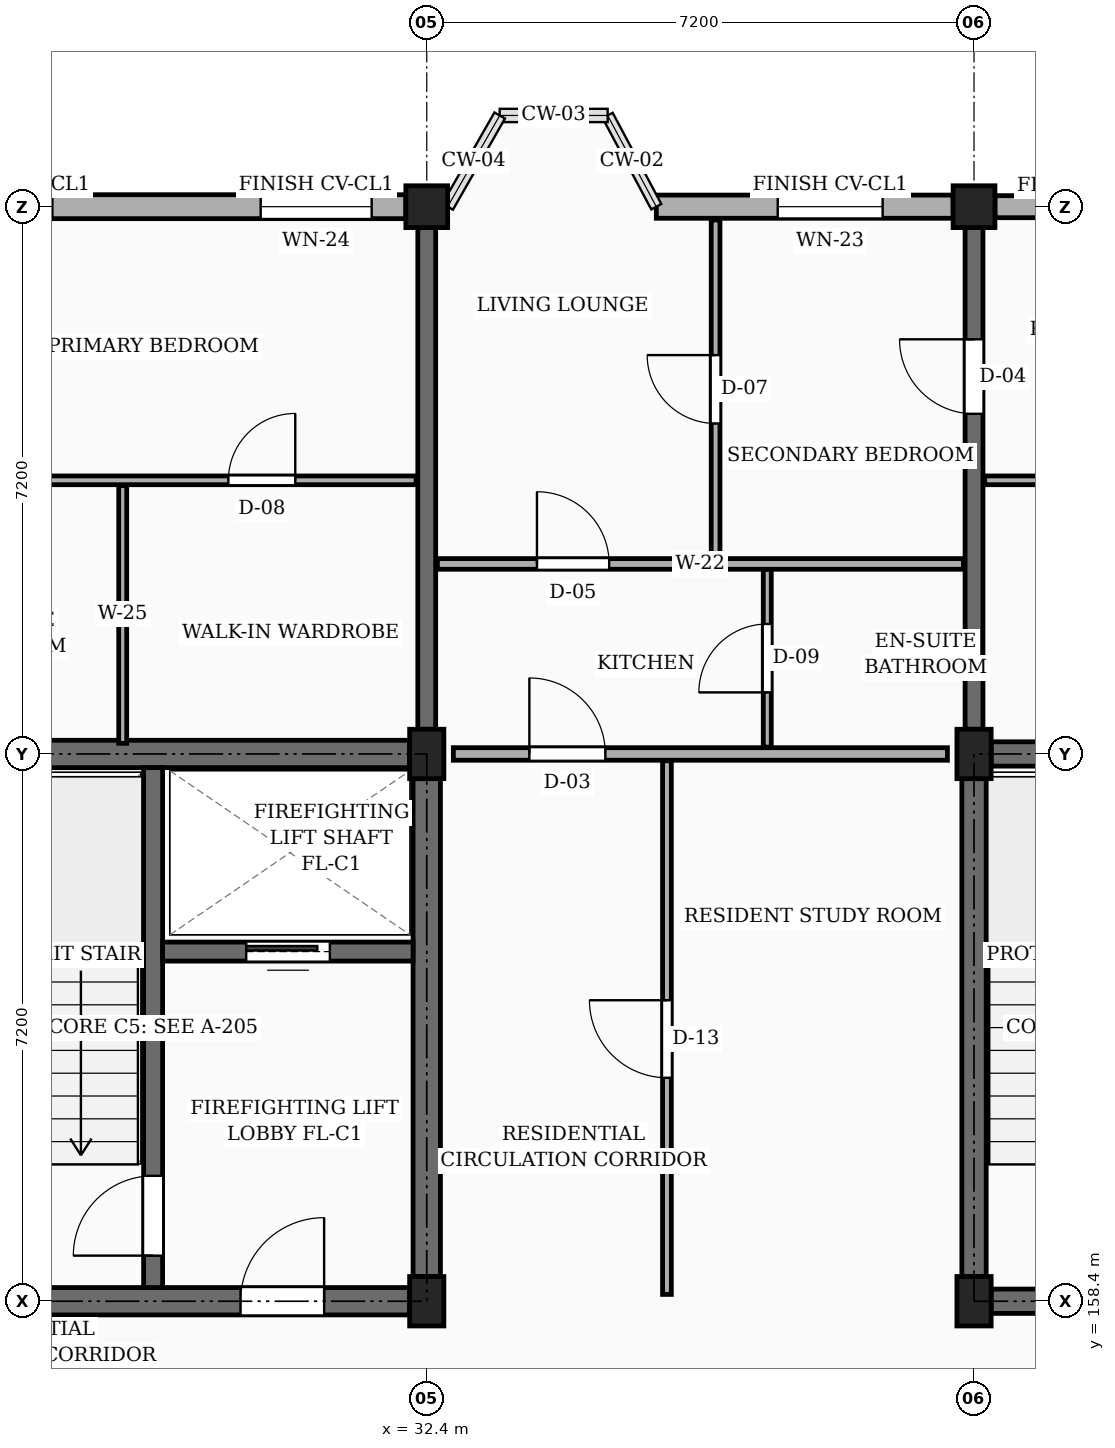
"""IFC4 building model, lengths in metres.
Left out: names, types, materials, properties, quantities, classifications, styles, units other than length and angle.
Written with IfcOpenShell. Run it as: python <this file> out.ifc"""

import sys

from ifc_helpers import new_model, si_unit, direction, frame, frame_2d, origin, origin_2d, place, context, subcontext, project, spatial, rectangle, extrude, element, fill, save


model = new_model("IFC4")
c1 = context("Model", 3, precision=1e-05, world=origin(), true_north=direction((0.0, 1.0)))
c2 = subcontext(c1, "Body", "Model", "MODEL_VIEW")
j1 = project(units=[si_unit("LENGTHUNIT", "METRE"), si_unit("PLANEANGLEUNIT", "RADIAN")], contexts=[c1])
p1 = place(None, origin())
s1 = spatial("IfcSite", under=j1, at=p1, CompositionType="ELEMENT")
p2 = place(p1, origin())
s2 = spatial("IfcBuilding", under=s1, at=p2, CompositionType="ELEMENT")
p3 = place(p2, frame((0.0, 0.0, 20.25)))
s3 = spatial("IfcBuildingStorey", under=s2, at=p3, CompositionType="ELEMENT", Elevation=20.25)
for number, where, z_axis, x_axis in (
    (1, (32.4, 158.4, 0.0), (0.0, 0.0, 1.0), (1.0, 0.0, 0.0)),
    (2, (32.4, 165.6, 0.0), (0.0, 0.0, 1.0), (1.0, 0.0, 0.0)),
):
    element("IfcColumn", number, at=place(p3, frame(where, z_axis=z_axis, x_axis=x_axis)), inside=s3, PredefinedType="COLUMN", context=c2, shape_type="SweptSolid", body=[
        extrude(rectangle(XDim=0.45, YDim=0.65, at=origin_2d()), origin(), (0.0, 0.0, 1.0), 3.15),
    ])
p4 = place(p3, frame((32.4, 172.8, 0.0), z_axis=(0.0, 0.0, 1.0), x_axis=(1.0, 0.0, 0.0)))
e3 = element("IfcColumn", 3, at=p4, inside=s3, PredefinedType="COLUMN", context=c2, shape_type="SweptSolid", body=[
    extrude(rectangle(XDim=0.55, YDim=0.55, at=origin_2d()), origin(), (0.0, 0.0, 1.0), 3.15),
])
for number, where, z_axis, x_axis in (
    (4, (39.6, 158.4, 0.0), (0.0, 0.0, 1.0), (1.0, 0.0, 0.0)),
    (5, (39.6, 165.6, 0.0), (0.0, 0.0, 1.0), (1.0, 0.0, 0.0)),
):
    element("IfcColumn", number, at=place(p3, frame(where, z_axis=z_axis, x_axis=x_axis)), inside=s3, PredefinedType="COLUMN", context=c2, shape_type="SweptSolid", body=[
        extrude(rectangle(XDim=0.45, YDim=0.65, at=origin_2d()), origin(), (0.0, 0.0, 1.0), 3.15),
    ])
p5 = place(p3, frame((39.6, 172.8, 0.0), z_axis=(0.0, 0.0, 1.0), x_axis=(1.0, 0.0, 0.0)))
e6 = element("IfcColumn", 6, at=p5, inside=s3, PredefinedType="COLUMN", context=c2, shape_type="SweptSolid", body=[
    extrude(rectangle(XDim=0.55, YDim=0.55, at=origin_2d()), origin(), (0.0, 0.0, 1.0), 3.15),
])
p6 = place(p3, frame((32.4, 165.925, 0.0), z_axis=(0.0, 0.0, 1.0), x_axis=(0.0, 1.0, 0.0)))
e7 = element("IfcWall", 7, at=p6, inside=s3, PredefinedType="SOLIDWALL", context=c2, shape_type="SweptSolid", body=[
    extrude(rectangle(XDim=6.6, YDim=0.235, at=frame_2d((3.3, 0.0))), origin(), (0.0, 0.0, 1.0), 2.185),
])
p7 = place(p3, frame((39.6, 165.925, 0.0), z_axis=(0.0, 0.0, 1.0), x_axis=(0.0, 1.0, 0.0)))
e8 = element("IfcWall", 8, at=p7, inside=s3, PredefinedType="SOLIDWALL", context=c2, shape_type="SweptSolid", body=[
    extrude(rectangle(XDim=6.6, YDim=0.235, at=frame_2d((3.3, 0.0))), origin(), (0.0, 0.0, 1.0), 2.185),
])
p8 = place(p7, frame((4.15, 0.0, 0.0)))
e9 = element("IfcOpeningElement", 9, at=p8, cuts=e8, PredefinedType="OPENING", context=c2, shape_type="SweptSolid", body=[
    extrude(rectangle(XDim=0.98, YDim=2.12, at=frame_2d((0.49, 1.06))), frame((0.0, 0.127, 0.0), z_axis=(0.0, -1.0, 0.0), x_axis=(1.0, 0.0, 0.0)), (0.0, 0.0, 1.0), 0.255),
])
p9 = place(p3, frame((46.525, 172.8, 0.0), z_axis=(0.0, 0.0, 1.0), x_axis=(-1.0, 0.0, 0.0)))
e10 = element("IfcWall", 10, at=p9, inside=s3, PredefinedType="SOLIDWALL", context=c2, shape_type="SweptSolid", body=[
    extrude(rectangle(XDim=6.65, YDim=0.29, at=frame_2d((3.325, 0.0))), origin(), (0.0, 0.0, 1.0), 2.455),
])
p10 = place(p9, frame((0.45, 0.0, 0.78)))
e11 = element("IfcOpeningElement", 11, at=p10, cuts=e10, PredefinedType="OPENING", context=c2, shape_type="SweptSolid", body=[
    extrude(rectangle(XDim=1.22, YDim=1.36, at=frame_2d((0.61, 0.68))), frame((0.0, 0.155, 0.0), z_axis=(0.0, -1.0, 0.0), x_axis=(1.0, 0.0, 0.0)), (0.0, 0.0, 1.0), 0.31),
])
p11 = place(p9, frame((4.65, 0.0, 0.78)))
e12 = element("IfcOpeningElement", 12, at=p11, cuts=e10, PredefinedType="OPENING", context=c2, shape_type="SweptSolid", body=[
    extrude(rectangle(XDim=1.38, YDim=1.36, at=frame_2d((0.69, 0.68))), frame((0.0, 0.155, 0.0), z_axis=(0.0, -1.0, 0.0), x_axis=(1.0, 0.0, 0.0)), (0.0, 0.0, 1.0), 0.31),
])
p12 = place(p3, frame((39.325, 172.8, 0.0), z_axis=(0.0, 0.0, 1.0), x_axis=(-1.0, 0.0, 0.0)))
e13 = element("IfcWall", 13, at=p12, inside=s3, PredefinedType="SOLIDWALL", context=c2, shape_type="SweptSolid", body=[
    extrude(rectangle(XDim=3.905, YDim=0.305, at=frame_2d((1.953, 0.0))), origin(), (0.0, 0.0, 1.0), 2.455),
])
p13 = place(p12, frame((0.927, 0.0, 0.78)))
e14 = element("IfcOpeningElement", 14, at=p13, cuts=e13, PredefinedType="OPENING", context=c2, shape_type="SweptSolid", body=[
    extrude(rectangle(XDim=1.38, YDim=1.36, at=frame_2d((0.69, 0.68))), frame((0.0, 0.163, 0.0), z_axis=(0.0, -1.0, 0.0), x_axis=(1.0, 0.0, 0.0)), (0.0, 0.0, 1.0), 0.325),
])
p14 = place(p3, frame((32.125, 172.8, 0.0), z_axis=(0.0, 0.0, 1.0), x_axis=(-1.0, 0.0, 0.0)))
e15 = element("IfcWall", 15, at=p14, inside=s3, PredefinedType="SOLIDWALL", context=c2, shape_type="SweptSolid", body=[
    extrude(rectangle(XDim=6.65, YDim=0.315, at=frame_2d((3.325, 0.0))), origin(), (0.0, 0.0, 1.0), 2.455),
])
p15 = place(p14, frame((0.45, 0.0, 0.78)))
e16 = element("IfcOpeningElement", 16, at=p15, cuts=e15, PredefinedType="OPENING", context=c2, shape_type="SweptSolid", body=[
    extrude(rectangle(XDim=1.46, YDim=1.36, at=frame_2d((0.73, 0.68))), frame((0.0, 0.167, 0.0), z_axis=(0.0, -1.0, 0.0), x_axis=(1.0, 0.0, 0.0)), (0.0, 0.0, 1.0), 0.335),
])
p16 = place(p14, frame((4.65, 0.0, 0.78)))
e17 = element("IfcOpeningElement", 17, at=p16, cuts=e15, PredefinedType="OPENING", context=c2, shape_type="SweptSolid", body=[
    extrude(rectangle(XDim=1.05, YDim=1.44, at=frame_2d((0.525, 0.72))), frame((0.0, 0.167, 0.0), z_axis=(0.0, -1.0, 0.0), x_axis=(1.0, 0.0, 0.0)), (0.0, 0.0, 1.0), 0.335),
])
p17 = place(p3, frame((25.425, 165.6, 0.0), z_axis=(0.0, 0.0, 1.0), x_axis=(1.0, 0.0, 0.0)))
e18 = element("IfcWall", 18, at=p17, inside=s3, PredefinedType="SHEAR", context=c2, shape_type="SweptSolid", body=[
    extrude(rectangle(XDim=6.75, YDim=0.36, at=frame_2d((3.375, 0.0))), origin(), (0.0, 0.0, 1.0), 2.885),
])
p18 = place(p3, frame((32.4, 158.725, 0.0), z_axis=(0.0, 0.0, 1.0), x_axis=(0.0, 1.0, 0.0)))
e19 = element("IfcWall", 19, at=p18, inside=s3, PredefinedType="SHEAR", context=c2, shape_type="SweptSolid", body=[
    extrude(rectangle(XDim=6.55, YDim=0.36, at=frame_2d((3.275, 0.0))), origin(), (0.0, 0.0, 1.0), 2.885),
])
p19 = place(p3, frame((25.425, 158.4, 0.0), z_axis=(0.0, 0.0, 1.0), x_axis=(1.0, 0.0, 0.0)))
e20 = element("IfcWall", 20, at=p19, inside=s3, PredefinedType="SHEAR", context=c2, shape_type="SweptSolid", body=[
    extrude(rectangle(XDim=6.75, YDim=0.36, at=frame_2d((3.375, 0.0))), origin(), (0.0, 0.0, 1.0), 2.885),
])
p20 = place(p19, frame((4.525, 0.0, 0.0)))
e21 = element("IfcOpeningElement", 21, at=p20, cuts=e20, PredefinedType="OPENING", context=c2, shape_type="SweptSolid", body=[
    extrude(rectangle(XDim=1.1, YDim=2.15, at=frame_2d((0.55, 1.075))), frame((0.0, 0.19, 0.0), z_axis=(0.0, -1.0, 0.0), x_axis=(1.0, 0.0, 0.0)), (0.0, 0.0, 1.0), 0.38),
])
p21 = place(p3, frame((28.8, 158.58, 0.0), z_axis=(0.0, 0.0, 1.0), x_axis=(0.0, 1.0, 0.0)))
e22 = element("IfcWall", 22, at=p21, inside=s3, PredefinedType="SHEAR", context=c2, shape_type="SweptSolid", body=[
    extrude(rectangle(XDim=6.84, YDim=0.25, at=frame_2d((3.42, 0.0))), origin(), (0.0, 0.0, 1.0), 2.885),
])
p22 = place(p21, frame((0.42, 0.0, 0.0)))
e23 = element("IfcOpeningElement", 23, at=p22, cuts=e22, PredefinedType="OPENING", context=c2, shape_type="SweptSolid", body=[
    extrude(rectangle(XDim=1.05, YDim=2.15, at=frame_2d((0.525, 1.075))), frame((0.0, 0.135, 0.0), z_axis=(0.0, -1.0, 0.0), x_axis=(1.0, 0.0, 0.0)), (0.0, 0.0, 1.0), 0.27),
])
p23 = place(p3, frame((28.925, 163.0, 0.0), z_axis=(0.0, 0.0, 1.0), x_axis=(1.0, 0.0, 0.0)))
e24 = element("IfcWall", 24, at=p23, inside=s3, PredefinedType="SHEAR", context=c2, shape_type="SweptSolid", body=[
    extrude(rectangle(XDim=3.295, YDim=0.25, at=frame_2d((1.647, 0.0))), origin(), (0.0, 0.0, 1.0), 2.885),
])
p24 = place(p23, frame((1.1, 0.0, 0.0)))
e25 = element("IfcOpeningElement", 25, at=p24, cuts=e24, PredefinedType="OPENING", context=c2, shape_type="SweptSolid", body=[
    extrude(rectangle(XDim=1.1, YDim=2.2, at=frame_2d((0.55, 1.1))), frame((0.0, 0.135, 0.0), z_axis=(0.0, -1.0, 0.0), x_axis=(1.0, 0.0, 0.0)), (0.0, 0.0, 1.0), 0.27),
])
p25 = place(p3, frame((39.6, 158.725, 0.0), z_axis=(0.0, 0.0, 1.0), x_axis=(0.0, 1.0, 0.0)))
e26 = element("IfcWall", 26, at=p25, inside=s3, PredefinedType="SHEAR", context=c2, shape_type="SweptSolid", body=[
    extrude(rectangle(XDim=6.55, YDim=0.32, at=frame_2d((3.275, 0.0))), origin(), (0.0, 0.0, 1.0), 2.885),
])
p26 = place(p3, frame((39.825, 165.6, 0.0), z_axis=(0.0, 0.0, 1.0), x_axis=(1.0, 0.0, 0.0)))
e27 = element("IfcWall", 27, at=p26, inside=s3, PredefinedType="SHEAR", context=c2, shape_type="SweptSolid", body=[
    extrude(rectangle(XDim=6.75, YDim=0.32, at=frame_2d((3.375, 0.0))), origin(), (0.0, 0.0, 1.0), 2.885),
])
p27 = place(p3, frame((39.825, 158.4, 0.0), z_axis=(0.0, 0.0, 1.0), x_axis=(1.0, 0.0, 0.0)))
e28 = element("IfcWall", 28, at=p27, inside=s3, PredefinedType="SHEAR", context=c2, shape_type="SweptSolid", body=[
    extrude(rectangle(XDim=6.75, YDim=0.32, at=frame_2d((3.375, 0.0))), origin(), (0.0, 0.0, 1.0), 2.885),
])
p28 = place(p27, frame((4.525, 0.0, 0.0)))
e29 = element("IfcOpeningElement", 29, at=p28, cuts=e28, PredefinedType="OPENING", context=c2, shape_type="SweptSolid", body=[
    extrude(rectangle(XDim=1.1, YDim=2.15, at=frame_2d((0.55, 1.075))), frame((0.0, 0.17, 0.0), z_axis=(0.0, -1.0, 0.0), x_axis=(1.0, 0.0, 0.0)), (0.0, 0.0, 1.0), 0.34),
])
p29 = place(p3, frame((32.75, 165.6, 0.0), z_axis=(0.0, 0.0, 1.0), x_axis=(1.0, 0.0, 0.0)))
e30 = element("IfcWall", 30, at=p29, inside=s3, PredefinedType="PARTITIONING", context=c2, shape_type="SweptSolid", body=[
    extrude(rectangle(XDim=6.5, YDim=0.165, at=frame_2d((3.25, 0.0))), origin(), (0.0, 0.0, 1.0), 2.32),
])
p30 = place(p29, frame((1.0, 0.0, 0.0)))
e31 = element("IfcOpeningElement", 31, at=p30, cuts=e30, PredefinedType="OPENING", context=c2, shape_type="SweptSolid", body=[
    extrude(rectangle(XDim=1.0, YDim=2.15, at=frame_2d((0.5, 1.075))), frame((0.0, 0.093, 0.0), z_axis=(0.0, -1.0, 0.0), x_axis=(1.0, 0.0, 0.0)), (0.0, 0.0, 1.0), 0.185),
])
p31 = place(p3, frame((25.34, 169.2, 0.0), z_axis=(0.0, 0.0, 1.0), x_axis=(1.0, 0.0, 0.0)))
e32 = element("IfcWall", 32, at=p31, inside=s3, PredefinedType="PARTITIONING", context=c2, shape_type="SweptSolid", body=[
    extrude(rectangle(XDim=6.92, YDim=0.115, at=frame_2d((3.46, 0.0))), origin(), (0.0, 0.0, 1.0), 2.32),
])
p32 = place(p31, frame((1.05, 0.0, 0.0)))
e33 = element("IfcOpeningElement", 33, at=p32, cuts=e32, PredefinedType="OPENING", context=c2, shape_type="SweptSolid", body=[
    extrude(rectangle(XDim=0.87, YDim=2.05, at=frame_2d((0.435, 1.025))), frame((0.0, 0.067, 0.0), z_axis=(0.0, -1.0, 0.0), x_axis=(1.0, 0.0, 0.0)), (0.0, 0.0, 1.0), 0.135),
])
p33 = place(p31, frame((4.45, 0.0, 0.0)))
e34 = element("IfcOpeningElement", 34, at=p33, cuts=e32, PredefinedType="OPENING", context=c2, shape_type="SweptSolid", body=[
    extrude(rectangle(XDim=0.88, YDim=2.08, at=frame_2d((0.44, 1.04))), frame((0.0, 0.067, 0.0), z_axis=(0.0, -1.0, 0.0), x_axis=(1.0, 0.0, 0.0)), (0.0, 0.0, 1.0), 0.135),
])
p34 = place(p3, frame((28.4, 165.74, 0.0), z_axis=(0.0, 0.0, 1.0), x_axis=(0.0, 1.0, 0.0)))
e35 = element("IfcWall", 35, at=p34, inside=s3, PredefinedType="PARTITIONING", context=c2, shape_type="SweptSolid", body=[
    extrude(rectangle(XDim=3.39, YDim=0.105, at=frame_2d((1.695, 0.0))), origin(), (0.0, 0.0, 1.0), 2.32),
])
p35 = place(p3, frame((35.56, 158.49, 0.0), z_axis=(0.0, 0.0, 1.0), x_axis=(0.0, 1.0, 0.0)))
e36 = element("IfcWall", 36, at=p35, inside=s3, PredefinedType="PARTITIONING", context=c2, shape_type="SweptSolid", body=[
    extrude(rectangle(XDim=7.02, YDim=0.115, at=frame_2d((3.51, 0.0))), origin(), (0.0, 0.0, 1.0), 2.32),
])
p36 = place(p35, frame((2.85, 0.0, 0.0)))
e37 = element("IfcOpeningElement", 37, at=p36, cuts=e36, PredefinedType="OPENING", context=c2, shape_type="SweptSolid", body=[
    extrude(rectangle(XDim=1.02, YDim=2.15, at=frame_2d((0.51, 1.075))), frame((0.0, 0.067, 0.0), z_axis=(0.0, -1.0, 0.0), x_axis=(1.0, 0.0, 0.0)), (0.0, 0.0, 1.0), 0.135),
])
p37 = place(p3, frame((36.2, 168.17, 0.0), z_axis=(0.0, 0.0, 1.0), x_axis=(0.0, 1.0, 0.0)))
e38 = element("IfcWall", 38, at=p37, inside=s3, PredefinedType="PARTITIONING", context=c2, shape_type="SweptSolid", body=[
    extrude(rectangle(XDim=4.455, YDim=0.115, at=frame_2d((2.228, 0.0))), origin(), (0.0, 0.0, 1.0), 2.32),
])
p38 = place(p37, frame((1.778, 0.0, 0.0)))
e39 = element("IfcOpeningElement", 39, at=p38, cuts=e38, PredefinedType="OPENING", context=c2, shape_type="SweptSolid", body=[
    extrude(rectangle(XDim=0.9, YDim=2.1, at=frame_2d((0.45, 1.05))), frame((0.0, 0.067, 0.0), z_axis=(0.0, -1.0, 0.0), x_axis=(1.0, 0.0, 0.0)), (0.0, 0.0, 1.0), 0.135),
])
p39 = place(p3, frame((36.88, 165.69, 0.0), z_axis=(0.0, 0.0, 1.0), x_axis=(0.0, 1.0, 0.0)))
e40 = element("IfcWall", 40, at=p39, inside=s3, PredefinedType="PARTITIONING", context=c2, shape_type="SweptSolid", body=[
    extrude(rectangle(XDim=2.34, YDim=0.105, at=frame_2d((1.17, 0.0))), origin(), (0.0, 0.0, 1.0), 2.32),
])
p40 = place(p39, frame((0.72, 0.0, 0.0)))
e41 = element("IfcOpeningElement", 41, at=p40, cuts=e40, PredefinedType="OPENING", context=c2, shape_type="SweptSolid", body=[
    extrude(rectangle(XDim=0.9, YDim=2.05, at=frame_2d((0.45, 1.025))), frame((0.0, 0.062, 0.0), z_axis=(0.0, -1.0, 0.0), x_axis=(1.0, 0.0, 0.0)), (0.0, 0.0, 1.0), 0.125),
])
p41 = place(p3, frame((32.54, 168.1, 0.0), z_axis=(0.0, 0.0, 1.0), x_axis=(1.0, 0.0, 0.0)))
e42 = element("IfcWall", 42, at=p41, inside=s3, PredefinedType="PARTITIONING", context=c2, shape_type="SweptSolid", body=[
    extrude(rectangle(XDim=6.92, YDim=0.14, at=frame_2d((3.46, 0.0))), origin(), (0.0, 0.0, 1.0), 2.32),
])
p42 = place(p41, frame((1.31, 0.0, 0.0)))
e43 = element("IfcOpeningElement", 43, at=p42, cuts=e42, PredefinedType="OPENING", context=c2, shape_type="SweptSolid", body=[
    extrude(rectangle(XDim=0.95, YDim=2.1, at=frame_2d((0.475, 1.05))), frame((0.0, 0.08, 0.0), z_axis=(0.0, -1.0, 0.0), x_axis=(1.0, 0.0, 0.0)), (0.0, 0.0, 1.0), 0.16),
])
p43 = place(p3, frame((39.74, 169.2, 0.0), z_axis=(0.0, 0.0, 1.0), x_axis=(1.0, 0.0, 0.0)))
e44 = element("IfcWall", 44, at=p43, inside=s3, PredefinedType="PARTITIONING", context=c2, shape_type="SweptSolid", body=[
    extrude(rectangle(XDim=6.92, YDim=0.115, at=frame_2d((3.46, 0.0))), origin(), (0.0, 0.0, 1.0), 2.32),
])
p44 = place(p43, frame((1.05, 0.0, 0.0)))
e45 = element("IfcOpeningElement", 45, at=p44, cuts=e44, PredefinedType="OPENING", context=c2, shape_type="SweptSolid", body=[
    extrude(rectangle(XDim=0.87, YDim=2.05, at=frame_2d((0.435, 1.025))), frame((0.0, 0.067, 0.0), z_axis=(0.0, -1.0, 0.0), x_axis=(1.0, 0.0, 0.0)), (0.0, 0.0, 1.0), 0.135),
])
p45 = place(p43, frame((4.45, 0.0, 0.0)))
e46 = element("IfcOpeningElement", 46, at=p45, cuts=e44, PredefinedType="OPENING", context=c2, shape_type="SweptSolid", body=[
    extrude(rectangle(XDim=0.88, YDim=2.08, at=frame_2d((0.44, 1.04))), frame((0.0, 0.067, 0.0), z_axis=(0.0, -1.0, 0.0), x_axis=(1.0, 0.0, 0.0)), (0.0, 0.0, 1.0), 0.135),
])
p46 = place(p13, origin())
e47 = element("IfcWindow", 47, at=p46, inside=s3, PartitioningType="SINGLE_PANEL", PredefinedType="WINDOW", context=c2, shape_type="SweptSolid", body=[
    extrude(rectangle(XDim=1.38, YDim=1.36, at=frame_2d((0.69, 0.68))), frame((0.0, 0.03, 0.0), z_axis=(0.0, -1.0, 0.0), x_axis=(1.0, 0.0, 0.0)), (0.0, 0.0, 1.0), 0.06),
])
fill(e14, e47)
p47 = place(p15, origin())
e48 = element("IfcWindow", 48, at=p47, inside=s3, PartitioningType="SINGLE_PANEL", PredefinedType="WINDOW", context=c2, shape_type="SweptSolid", body=[
    extrude(rectangle(XDim=1.46, YDim=1.36, at=frame_2d((0.73, 0.68))), frame((0.0, 0.03, 0.0), z_axis=(0.0, -1.0, 0.0), x_axis=(1.0, 0.0, 0.0)), (0.0, 0.0, 1.0), 0.06),
])
fill(e16, e48)
p48 = place(p20, frame((1.1, 0.0, 0.0), z_axis=(0.0, 0.0, 1.0), x_axis=(-1.0, 0.0, 0.0)))
e49 = element("IfcDoor", 49, at=p48, inside=s3, OperationType="SINGLE_SWING_RIGHT", PredefinedType="DOOR", context=c2, shape_type="SweptSolid", body=[
    extrude(rectangle(XDim=1.1, YDim=2.15, at=frame_2d((0.55, 1.075))), frame((0.0, 0.025, 0.0), z_axis=(0.0, -1.0, 0.0), x_axis=(1.0, 0.0, 0.0)), (0.0, 0.0, 1.0), 0.05),
])
fill(e21, e49)
p49 = place(p22, origin())
e50 = element("IfcDoor", 50, at=p49, inside=s3, OperationType="SINGLE_SWING_LEFT", PredefinedType="DOOR", context=c2, shape_type="SweptSolid", body=[
    extrude(rectangle(XDim=1.05, YDim=2.15, at=frame_2d((0.525, 1.075))), frame((0.0, 0.025, 0.0), z_axis=(0.0, -1.0, 0.0), x_axis=(1.0, 0.0, 0.0)), (0.0, 0.0, 1.0), 0.05),
])
fill(e23, e50)
p50 = place(p24, origin())
e51 = element("IfcDoor", 51, at=p50, inside=s3, OperationType="SLIDING_TO_LEFT", PredefinedType="DOOR", context=c2, shape_type="SweptSolid", body=[
    extrude(rectangle(XDim=1.1, YDim=2.2, at=frame_2d((0.55, 1.1))), frame((0.0, 0.025, 0.0), z_axis=(0.0, -1.0, 0.0), x_axis=(1.0, 0.0, 0.0)), (0.0, 0.0, 1.0), 0.05),
])
fill(e25, e51)
p51 = place(p30, origin())
e52 = element("IfcDoor", 52, at=p51, inside=s3, OperationType="SINGLE_SWING_LEFT", PredefinedType="DOOR", context=c2, shape_type="SweptSolid", body=[
    extrude(rectangle(XDim=1.0, YDim=2.15, at=frame_2d((0.5, 1.075))), frame((0.0, 0.025, 0.0), z_axis=(0.0, -1.0, 0.0), x_axis=(1.0, 0.0, 0.0)), (0.0, 0.0, 1.0), 0.05),
])
fill(e31, e52)
p52 = place(p33, origin())
e53 = element("IfcDoor", 53, at=p52, inside=s3, OperationType="SINGLE_SWING_RIGHT", PredefinedType="DOOR", context=c2, shape_type="SweptSolid", body=[
    extrude(rectangle(XDim=0.88, YDim=2.08, at=frame_2d((0.44, 1.04))), frame((0.0, 0.025, 0.0), z_axis=(0.0, -1.0, 0.0), x_axis=(1.0, 0.0, 0.0)), (0.0, 0.0, 1.0), 0.05),
])
fill(e34, e53)
p53 = place(p36, origin())
e54 = element("IfcDoor", 54, at=p53, inside=s3, OperationType="SINGLE_SWING_RIGHT", PredefinedType="DOOR", context=c2, shape_type="SweptSolid", body=[
    extrude(rectangle(XDim=1.02, YDim=2.15, at=frame_2d((0.51, 1.075))), frame((0.0, 0.025, 0.0), z_axis=(0.0, -1.0, 0.0), x_axis=(1.0, 0.0, 0.0)), (0.0, 0.0, 1.0), 0.05),
])
fill(e37, e54)
p54 = place(p38, origin())
e55 = element("IfcDoor", 55, at=p54, inside=s3, OperationType="SINGLE_SWING_RIGHT", PredefinedType="DOOR", context=c2, shape_type="SweptSolid", body=[
    extrude(rectangle(XDim=0.9, YDim=2.1, at=frame_2d((0.45, 1.05))), frame((0.0, 0.025, 0.0), z_axis=(0.0, -1.0, 0.0), x_axis=(1.0, 0.0, 0.0)), (0.0, 0.0, 1.0), 0.05),
])
fill(e39, e55)
p55 = place(p40, origin())
e56 = element("IfcDoor", 56, at=p55, inside=s3, OperationType="SINGLE_SWING_LEFT", PredefinedType="DOOR", context=c2, shape_type="SweptSolid", body=[
    extrude(rectangle(XDim=0.9, YDim=2.05, at=frame_2d((0.45, 1.025))), frame((0.0, 0.025, 0.0), z_axis=(0.0, -1.0, 0.0), x_axis=(1.0, 0.0, 0.0)), (0.0, 0.0, 1.0), 0.05),
])
fill(e41, e56)
p56 = place(p42, origin())
e57 = element("IfcDoor", 57, at=p56, inside=s3, OperationType="SINGLE_SWING_LEFT", PredefinedType="DOOR", context=c2, shape_type="SweptSolid", body=[
    extrude(rectangle(XDim=0.95, YDim=2.1, at=frame_2d((0.475, 1.05))), frame((0.0, 0.025, 0.0), z_axis=(0.0, -1.0, 0.0), x_axis=(1.0, 0.0, 0.0)), (0.0, 0.0, 1.0), 0.05),
])
fill(e43, e57)
p57 = place(p8, origin())
e58 = element("IfcDoor", 58, at=p57, inside=s3, OperationType="SINGLE_SWING_RIGHT", PredefinedType="DOOR", context=c2, shape_type="SweptSolid", body=[
    extrude(rectangle(XDim=0.98, YDim=2.12, at=frame_2d((0.49, 1.06))), frame((0.0, 0.025, 0.0), z_axis=(0.0, -1.0, 0.0), x_axis=(1.0, 0.0, 0.0)), (0.0, 0.0, 1.0), 0.05),
])
fill(e9, e58)
save(model, sys.argv[1])
